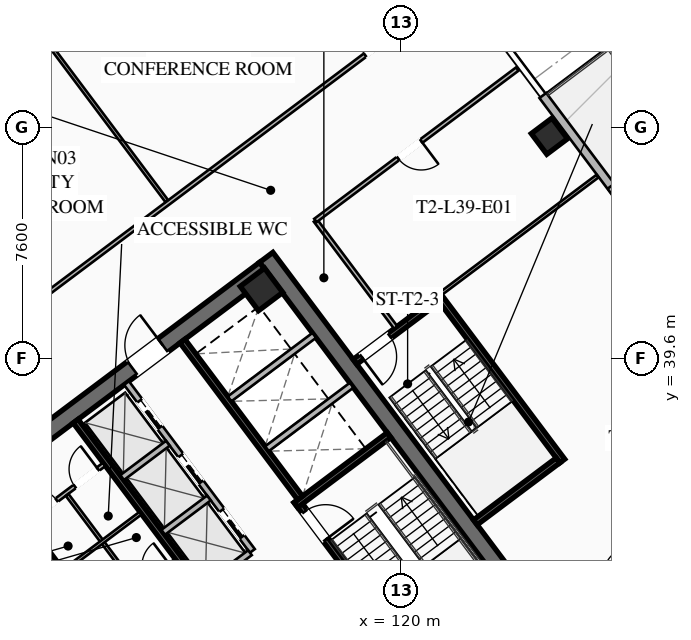
"""IFC4 building model, lengths in metres.
Left out: names, types, materials, properties, quantities, classifications, styles, units other than length and angle.
Written with IfcOpenShell. Run it as: python <this file> out.ifc"""

import sys

from ifc_helpers import new_model, si_unit, direction, frame, frame_2d, origin, origin_2d, place, context, subcontext, project, spatial, rectangle, hollow_rectangle, extrude, element, fill, save


model = new_model("IFC4")
c1 = context("Model", 3, precision=1e-05, world=origin(), true_north=direction((0.0, 1.0)))
c2 = subcontext(c1, "Body", "Model", "MODEL_VIEW")
j1 = project(units=[si_unit("LENGTHUNIT", "METRE"), si_unit("PLANEANGLEUNIT", "RADIAN")], contexts=[c1])
p1 = place(None, origin())
s1 = spatial("IfcSite", under=j1, at=p1, CompositionType="ELEMENT")
p2 = place(p1, origin())
s2 = spatial("IfcBuilding", under=s1, at=p2, CompositionType="ELEMENT")
p3 = place(p2, frame((0.0, 0.0, 146.35)))
s3 = spatial("IfcBuildingStorey", under=s2, at=p3, CompositionType="ELEMENT", Elevation=146.35)
for number, where, z_axis, x_axis in (
    (1, (112.436, 21.077, 0.0), (0.0, 0.0, 1.0), (-0.6, 0.8, 0.0)),
    (2, (115.564, 42.923, 0.0), (0.0, 0.0, 1.0), (0.6, -0.8, 0.0)),
):
    element("IfcWall", number, at=place(p3, frame(where, z_axis=z_axis, x_axis=x_axis)), inside=s3, PredefinedType="SHEAR", context=c2, shape_type="SweptSolid", body=[
        extrude(rectangle(XDim=15.6, YDim=0.55, at=frame_2d((7.8, 0.0))), origin(), (0.0, 0.0, 1.0), 3.55),
    ])
p4 = place(p3, frame((103.461, 33.502, 0.0), z_axis=(0.0, 0.0, 1.0), x_axis=(0.799998054672, 0.600002593761, 0.0)))
e3 = element("IfcWall", 3, at=p4, inside=s3, PredefinedType="SHEAR", context=c2, shape_type="SweptSolid", body=[
    extrude(rectangle(XDim=15.06, YDim=0.55, at=frame_2d((7.53, 0.0))), origin(), (0.0, 0.0, 1.0), 3.55),
])
p5 = place(p4, frame((4.58, 0.0, 0.0)))
e4 = element("IfcOpeningElement", 4, at=p5, cuts=e3, PredefinedType="OPENING", context=c2, shape_type="SweptSolid", body=[
    extrude(rectangle(XDim=1.25, YDim=2.25, at=frame_2d((0.625, 1.125))), frame((0.0, 0.285, 0.0), z_axis=(0.0, -1.0, 0.0), x_axis=(1.0, 0.0, 0.0)), (0.0, 0.0, 1.0), 0.57),
])
p6 = place(p4, frame((9.63, 0.0, 0.0)))
e5 = element("IfcOpeningElement", 5, at=p6, cuts=e3, PredefinedType="OPENING", context=c2, shape_type="SweptSolid", body=[
    extrude(rectangle(XDim=1.25, YDim=2.25, at=frame_2d((0.625, 1.125))), frame((0.0, 0.285, 0.0), z_axis=(0.0, -1.0, 0.0), x_axis=(1.0, 0.0, 0.0)), (0.0, 0.0, 1.0), 0.57),
])
p7 = place(p3, frame((115.41, 41.87, 0.0), z_axis=(0.0, 0.0, 1.0), x_axis=(0.799999996291, 0.600000004945, 0.0)))
e6 = element("IfcColumn", 6, at=p7, inside=s3, PredefinedType="COLUMN", context=c2, shape_type="SweptSolid", body=[
    extrude(hollow_rectangle(XDim=1.0, YDim=1.0, WallThickness=0.04, at=origin_2d()), origin(), (0.0, 0.0, 1.0), 3.37),
])
p8 = place(p3, frame((124.88, 46.91, 0.0), z_axis=(0.0, 0.0, 1.0), x_axis=(0.799999996291, 0.600000004945, 0.0)))
e7 = element("IfcColumn", 7, at=p8, inside=s3, PredefinedType="COLUMN", context=c2, shape_type="SweptSolid", body=[
    extrude(hollow_rectangle(XDim=0.85, YDim=0.85, WallThickness=0.035, at=origin_2d()), origin(), (0.0, 0.0, 1.0), 3.37),
])
p9 = place(p3, frame((124.664, 48.248, 0.0), z_axis=(0.0, 0.0, 1.0), x_axis=(0.599994081423, -0.800004438899, 0.0)))
e8 = element("IfcWall", 8, at=p9, inside=s3, PredefinedType="SOLIDWALL", context=c2, shape_type="SweptSolid", body=[
    extrude(rectangle(XDim=13.2, YDim=0.28, at=frame_2d((6.6, 0.0))), origin(), (0.0, 0.0, 1.0), 3.37),
])
p10 = place(p9, frame((5.95, 0.0, 0.0)))
e9 = element("IfcOpeningElement", 9, at=p10, cuts=e8, PredefinedType="OPENING", context=c2, shape_type="SweptSolid", body=[
    extrude(rectangle(XDim=1.3, YDim=2.15, at=frame_2d((0.65, 1.075))), frame((0.0, 0.15, 0.0), z_axis=(0.0, -1.0, 0.0), x_axis=(1.0, 0.0, 0.0)), (0.0, 0.0, 1.0), 0.3),
])
p11 = place(p9, frame((3.732, 0.0, 0.85)))
e10 = element("IfcOpeningElement", 10, at=p11, cuts=e8, PredefinedType="OPENING", context=c2, shape_type="SweptSolid", body=[
    extrude(rectangle(XDim=1.8, YDim=1.92, at=frame_2d((0.9, 0.96))), frame((0.0, 0.15, 0.0), z_axis=(0.0, -1.0, 0.0), x_axis=(1.0, 0.0, 0.0)), (0.0, 0.0, 1.0), 0.3),
])
p12 = place(p9, frame((7.668, 0.0, 0.85)))
e11 = element("IfcOpeningElement", 11, at=p12, cuts=e8, PredefinedType="OPENING", context=c2, shape_type="SweptSolid", body=[
    extrude(rectangle(XDim=1.8, YDim=1.92, at=frame_2d((0.9, 0.96))), frame((0.0, 0.15, 0.0), z_axis=(0.0, -1.0, 0.0), x_axis=(1.0, 0.0, 0.0)), (0.0, 0.0, 1.0), 0.3),
])
p13 = place(p3, frame((111.44, 29.08, 0.0), z_axis=(0.0, 0.0, 1.0), x_axis=(-0.59999029481, 0.8000072788, 0.0)))
e12 = element("IfcWall", 12, at=p13, inside=s3, PredefinedType="SHEAR", context=c2, shape_type="SweptSolid", body=[
    extrude(rectangle(XDim=8.05, YDim=0.2, at=frame_2d((4.025, 0.0))), origin(), (0.0, 0.0, 1.0), 3.37),
])
p14 = place(p13, frame((0.45, 0.0, 0.0)))
e13 = element("IfcOpeningElement", 13, at=p14, cuts=e12, PredefinedType="OPENING", context=c2, shape_type="SweptSolid", body=[
    extrude(rectangle(XDim=1.15, YDim=2.2, at=frame_2d((0.575, 1.1))), frame((0.0, 0.11, 0.0), z_axis=(0.0, -1.0, 0.0), x_axis=(1.0, 0.0, 0.0)), (0.0, 0.0, 1.0), 0.22),
])
p15 = place(p3, frame((116.56, 34.92, 0.0), z_axis=(0.0, 0.0, 1.0), x_axis=(0.59999029481, -0.8000072788, 0.0)))
e14 = element("IfcWall", 14, at=p15, inside=s3, PredefinedType="SHEAR", context=c2, shape_type="SweptSolid", body=[
    extrude(rectangle(XDim=8.05, YDim=0.2, at=frame_2d((4.025, 0.0))), origin(), (0.0, 0.0, 1.0), 3.37),
])
p16 = place(p15, frame((0.45, 0.0, 0.0)))
e15 = element("IfcOpeningElement", 15, at=p16, cuts=e14, PredefinedType="OPENING", context=c2, shape_type="SweptSolid", body=[
    extrude(rectangle(XDim=1.15, YDim=2.2, at=frame_2d((0.575, 1.1))), frame((0.0, 0.11, 0.0), z_axis=(0.0, -1.0, 0.0), x_axis=(1.0, 0.0, 0.0)), (0.0, 0.0, 1.0), 0.22),
])
p17 = place(p3, frame((116.54, 34.78, 0.0), z_axis=(0.0, 0.0, 1.0), x_axis=(0.800015298837, 0.599979601008, 0.0)))
e16 = element("IfcWall", 16, at=p17, inside=s3, PredefinedType="SHEAR", context=c2, shape_type="SweptSolid", body=[
    extrude(rectangle(XDim=3.83, YDim=0.2, at=frame_2d((1.915, 0.0))), origin(), (0.0, 0.0, 1.0), 3.37),
])
p18 = place(p3, frame((117.998, 25.936, 0.0), z_axis=(0.0, 0.0, 1.0), x_axis=(-0.600002693989, 0.799997979501, 0.0)))
e17 = element("IfcWall", 17, at=p18, inside=s3, PredefinedType="SHEAR", context=c2, shape_type="SweptSolid", body=[
    extrude(rectangle(XDim=14.5, YDim=0.2, at=frame_2d((7.25, 0.0))), origin(), (0.0, 0.0, 1.0), 3.37),
])
p19 = place(p3, frame((110.104, 31.028, 0.0), z_axis=(0.0, 0.0, 1.0), x_axis=(0.800018601094, 0.59997519774, 0.0)))
e18 = element("IfcWall", 18, at=p19, inside=s3, PredefinedType="SOLIDWALL", context=c2, shape_type="SweptSolid", body=[
    extrude(rectangle(XDim=3.15, YDim=0.22, at=frame_2d((1.575, 0.0))), origin(), (0.0, 0.0, 1.0), 2.723),
])
p20 = place(p19, frame((0.25, 0.0, 0.0)))
e19 = element("IfcOpeningElement", 19, at=p20, cuts=e18, PredefinedType="OPENING", context=c2, shape_type="SweptSolid", body=[
    extrude(rectangle(XDim=0.95, YDim=2.05, at=frame_2d((0.475, 1.025))), frame((0.0, 0.12, 0.0), z_axis=(0.0, -1.0, 0.0), x_axis=(1.0, 0.0, 0.0)), (0.0, 0.0, 1.0), 0.24),
])
p21 = place(p19, frame((1.95, 0.0, 0.0)))
e20 = element("IfcOpeningElement", 20, at=p21, cuts=e18, PredefinedType="OPENING", context=c2, shape_type="SweptSolid", body=[
    extrude(rectangle(XDim=0.95, YDim=2.05, at=frame_2d((0.475, 1.025))), frame((0.0, 0.12, 0.0), z_axis=(0.0, -1.0, 0.0), x_axis=(1.0, 0.0, 0.0)), (0.0, 0.0, 1.0), 0.24),
])
p22 = place(p3, frame((112.81, 40.17, 0.0), z_axis=(0.0, 0.0, 1.0), x_axis=(0.599993943644, -0.800004542231, 0.0)))
e21 = element("IfcWall", 21, at=p22, inside=s3, PredefinedType="SHEAR", context=c2, shape_type="SweptSolid", body=[
    extrude(rectangle(XDim=6.45, YDim=0.2, at=frame_2d((3.225, 0.0))), origin(), (0.0, 0.0, 1.0), 3.37),
])
for number, where, z_axis, x_axis in (
    (22, (115.59, 36.63, 0.0), (0.0, 0.0, 1.0), (0.8, 0.6, 0.0)),
    (23, (114.36, 38.27, 0.0), (0.0, 0.0, 1.0), (0.8, 0.6, 0.0)),
):
    element("IfcWall", number, at=place(p3, frame(where, z_axis=z_axis, x_axis=x_axis)), inside=s3, PredefinedType="SOLIDWALL", context=c2, shape_type="SweptSolid", body=[
        extrude(rectangle(XDim=3.48, YDim=0.2, at=frame_2d((1.74, 0.0))), origin(), (0.0, 0.0, 1.0), 3.37),
    ])
p23 = place(p3, frame((107.71, 34.22, 0.0), z_axis=(0.0, 0.0, 1.0), x_axis=(0.799981399002, 0.60002480053, 0.0)))
e24 = element("IfcWall", 24, at=p23, inside=s3, PredefinedType="PARTITIONING", context=c2, shape_type="SweptSolid", body=[
    extrude(rectangle(XDim=3.15, YDim=0.135, at=frame_2d((1.575, 0.0))), origin(), (0.0, 0.0, 1.0), 2.723),
])
p24 = place(p23, frame((0.25, 0.0, 0.0)))
e25 = element("IfcOpeningElement", 25, at=p24, cuts=e24, PredefinedType="OPENING", context=c2, shape_type="SweptSolid", body=[
    extrude(rectangle(XDim=0.95, YDim=2.05, at=frame_2d((0.475, 1.025))), frame((0.0, 0.077, 0.0), z_axis=(0.0, -1.0, 0.0), x_axis=(1.0, 0.0, 0.0)), (0.0, 0.0, 1.0), 0.155),
])
p25 = place(p23, frame((1.95, 0.0, 0.0)))
e26 = element("IfcOpeningElement", 26, at=p25, cuts=e24, PredefinedType="OPENING", context=c2, shape_type="SweptSolid", body=[
    extrude(rectangle(XDim=0.95, YDim=2.05, at=frame_2d((0.475, 1.025))), frame((0.0, 0.077, 0.0), z_axis=(0.0, -1.0, 0.0), x_axis=(1.0, 0.0, 0.0)), (0.0, 0.0, 1.0), 0.155),
])
p26 = place(p3, frame((111.296, 32.072, 0.0), z_axis=(0.0, 0.0, 1.0), x_axis=(-0.59995887973, 0.800030838552, 0.0)))
e27 = element("IfcWall", 27, at=p26, inside=s3, PredefinedType="PARTITIONING", context=c2, shape_type="SweptSolid", body=[
    extrude(rectangle(XDim=3.8, YDim=0.11, at=frame_2d((1.9, 0.0))), origin(), (0.0, 0.0, 1.0), 2.723),
])
p27 = place(p3, frame((108.91, 32.62, 0.0), z_axis=(0.0, 0.0, 1.0), x_axis=(0.800018601094, 0.59997519774, 0.0)))
e28 = element("IfcWall", 28, at=p27, inside=s3, PredefinedType="PARTITIONING", context=c2, shape_type="SweptSolid", body=[
    extrude(rectangle(XDim=3.15, YDim=0.11, at=frame_2d((1.575, 0.0))), origin(), (0.0, 0.0, 1.0), 2.723),
])
p28 = place(p3, frame((115.11, 33.27, 0.0), z_axis=(0.0, 0.0, 1.0), x_axis=(-0.600011322243, 0.799991508192, 0.0)))
e29 = element("IfcWall", 29, at=p28, inside=s3, PredefinedType="SOLIDWALL", context=c2, shape_type="SweptSolid", body=[
    extrude(rectangle(XDim=6.9, YDim=0.2, at=frame_2d((3.45, 0.0))), origin(), (0.0, 0.0, 1.0), 3.37),
])
p29 = place(p28, frame((0.575, 0.0, 0.0)))
e30 = element("IfcOpeningElement", 30, at=p29, cuts=e29, PredefinedType="OPENING", context=c2, shape_type="SweptSolid", body=[
    extrude(rectangle(XDim=1.1, YDim=2.2, at=frame_2d((0.55, 1.1))), frame((0.0, 0.11, 0.0), z_axis=(0.0, -1.0, 0.0), x_axis=(1.0, 0.0, 0.0)), (0.0, 0.0, 1.0), 0.22),
])
p30 = place(p28, frame((2.825, 0.0, 0.0)))
e31 = element("IfcOpeningElement", 31, at=p30, cuts=e29, PredefinedType="OPENING", context=c2, shape_type="SweptSolid", body=[
    extrude(rectangle(XDim=1.1, YDim=2.2, at=frame_2d((0.55, 1.1))), frame((0.0, 0.11, 0.0), z_axis=(0.0, -1.0, 0.0), x_axis=(1.0, 0.0, 0.0)), (0.0, 0.0, 1.0), 0.22),
])
p31 = place(p28, frame((5.075, 0.0, 0.0)))
e32 = element("IfcOpeningElement", 32, at=p31, cuts=e29, PredefinedType="OPENING", context=c2, shape_type="SweptSolid", body=[
    extrude(rectangle(XDim=1.1, YDim=2.2, at=frame_2d((0.55, 1.1))), frame((0.0, 0.11, 0.0), z_axis=(0.0, -1.0, 0.0), x_axis=(1.0, 0.0, 0.0)), (0.0, 0.0, 1.0), 0.22),
])
p32 = place(p3, frame((113.526, 32.082, 0.0), z_axis=(0.0, 0.0, 1.0), x_axis=(0.800046745961, 0.599937666993, 0.0)))
e33 = element("IfcWall", 33, at=p32, inside=s3, PredefinedType="SOLIDWALL", context=c2, shape_type="SweptSolid", body=[
    extrude(rectangle(XDim=1.88, YDim=0.2, at=frame_2d((0.94, 0.0))), origin(), (0.0, 0.0, 1.0), 3.37),
])
p33 = place(p3, frame((112.176, 33.882, 0.0), z_axis=(0.0, 0.0, 1.0), x_axis=(0.8, 0.6, 0.0)))
e34 = element("IfcWall", 34, at=p33, inside=s3, PredefinedType="SOLIDWALL", context=c2, shape_type="SweptSolid", body=[
    extrude(rectangle(XDim=1.88, YDim=0.2, at=frame_2d((0.94, 0.0))), origin(), (0.0, 0.0, 1.0), 3.37),
])
p34 = place(p3, frame((110.826, 35.682, 0.0), z_axis=(0.0, 0.0, 1.0), x_axis=(0.799984418148, 0.600020775241, 0.0)))
e35 = element("IfcWall", 35, at=p34, inside=s3, PredefinedType="SOLIDWALL", context=c2, shape_type="SweptSolid", body=[
    extrude(rectangle(XDim=1.88, YDim=0.2, at=frame_2d((0.94, 0.0))), origin(), (0.0, 0.0, 1.0), 3.37),
])
p35 = place(p3, frame((125.304, 36.228, 0.0), z_axis=(0.0, 0.0, 1.0), x_axis=(-0.59998851072, 0.800008616831, 0.0)))
e36 = element("IfcWall", 36, at=p35, inside=s3, PredefinedType="SHEAR", context=c2, shape_type="SweptSolid", body=[
    extrude(rectangle(XDim=6.8, YDim=0.2, at=frame_2d((3.4, 0.0))), origin(), (0.0, 0.0, 1.0), 3.37),
])
p36 = place(p3, frame((121.204, 41.528, 0.0), z_axis=(0.0, 0.0, 1.0), x_axis=(-0.800017232136, -0.599977023131, 0.0)))
e37 = element("IfcWall", 37, at=p36, inside=s3, PredefinedType="SHEAR", context=c2, shape_type="SweptSolid", body=[
    extrude(rectangle(XDim=3.4, YDim=0.2, at=frame_2d((1.7, 0.0))), origin(), (0.0, 0.0, 1.0), 3.37),
])
p37 = place(p36, frame((1.975, 0.0, 0.0)))
e38 = element("IfcOpeningElement", 38, at=p37, cuts=e37, PredefinedType="OPENING", context=c2, shape_type="SweptSolid", body=[
    extrude(rectangle(XDim=1.15, YDim=2.2, at=frame_2d((0.575, 1.1))), frame((0.0, 0.11, 0.0), z_axis=(0.0, -1.0, 0.0), x_axis=(1.0, 0.0, 0.0)), (0.0, 0.0, 1.0), 0.22),
])
p38 = place(p3, frame((122.444, 34.208, 0.0), z_axis=(0.0, 0.0, 1.0), x_axis=(0.79999138319, 0.600011488909, 0.0)))
e39 = element("IfcWall", 39, at=p38, inside=s3, PredefinedType="SHEAR", context=c2, shape_type="SweptSolid", body=[
    extrude(rectangle(XDim=3.4, YDim=0.2, at=frame_2d((1.7, 0.0))), origin(), (0.0, 0.0, 1.0), 3.37),
])
p39 = place(p3, frame((119.824, 40.618, 0.0), z_axis=(0.0, 0.0, 1.0), x_axis=(-0.599982243973, 0.800013316712, 0.0)))
e40 = element("IfcWall", 40, at=p39, inside=s3, PredefinedType="PARTITIONING", context=c2, shape_type="SweptSolid", body=[
    extrude(rectangle(XDim=4.4, YDim=0.135, at=frame_2d((2.2, 0.0))), origin(), (0.0, 0.0, 1.0), 2.723),
])
p40 = place(p3, frame((94.778, 31.546, 0.0), z_axis=(0.0, 0.0, 1.0), x_axis=(0.8, 0.6, 0.0)))
e41 = element("IfcWall", 41, at=p40, inside=s3, PredefinedType="PARTITIONING", context=c2, shape_type="SweptSolid", body=[
    extrude(rectangle(XDim=31.3, YDim=0.135, at=frame_2d((15.65, 0.0))), origin(), (0.0, 0.0, 1.0), 2.723),
])
p41 = place(p40, frame((0.3, 0.0, 0.0)))
e42 = element("IfcOpeningElement", 42, at=p41, cuts=e41, PredefinedType="OPENING", context=c2, shape_type="SweptSolid", body=[
    extrude(rectangle(XDim=0.95, YDim=2.05, at=frame_2d((0.475, 1.025))), frame((0.0, 0.077, 0.0), z_axis=(0.0, -1.0, 0.0), x_axis=(1.0, 0.0, 0.0)), (0.0, 0.0, 1.0), 0.155),
])
p42 = place(p40, frame((11.21, 0.0, 0.0)))
e43 = element("IfcOpeningElement", 43, at=p42, cuts=e41, PredefinedType="OPENING", context=c2, shape_type="SweptSolid", body=[
    extrude(rectangle(XDim=0.95, YDim=2.05, at=frame_2d((0.475, 1.025))), frame((0.0, 0.077, 0.0), z_axis=(0.0, -1.0, 0.0), x_axis=(1.0, 0.0, 0.0)), (0.0, 0.0, 1.0), 0.155),
])
p43 = place(p40, frame((15.487, 0.0, 0.0)))
e44 = element("IfcOpeningElement", 44, at=p43, cuts=e41, PredefinedType="OPENING", context=c2, shape_type="SweptSolid", body=[
    extrude(rectangle(XDim=0.95, YDim=2.05, at=frame_2d((0.475, 1.025))), frame((0.0, 0.077, 0.0), z_axis=(0.0, -1.0, 0.0), x_axis=(1.0, 0.0, 0.0)), (0.0, 0.0, 1.0), 0.155),
])
p44 = place(p40, frame((30.05, 0.0, 0.0)))
e45 = element("IfcOpeningElement", 45, at=p44, cuts=e41, PredefinedType="OPENING", context=c2, shape_type="SweptSolid", body=[
    extrude(rectangle(XDim=0.95, YDim=2.05, at=frame_2d((0.475, 1.025))), frame((0.0, 0.077, 0.0), z_axis=(0.0, -1.0, 0.0), x_axis=(1.0, 0.0, 0.0)), (0.0, 0.0, 1.0), 0.155),
])
p45 = place(p3, frame((112.29, 44.78, 0.0), z_axis=(0.0, 0.0, 1.0), x_axis=(-0.6, 0.8, 0.0)))
e46 = element("IfcWall", 46, at=p45, inside=s3, PredefinedType="PARTITIONING", context=c2, shape_type="SweptSolid", body=[
    extrude(rectangle(XDim=7.03, YDim=0.11, at=frame_2d((3.515, 0.0))), origin(), (0.0, 0.0, 1.0), 2.723),
])
p46 = place(p3, frame((132.13, 33.91, 0.0), z_axis=(0.0, 0.0, 1.0), x_axis=(-0.799997191971, -0.600003744021, 0.0)))
e47 = element("IfcWall", 47, at=p46, inside=s3, PredefinedType="PARTITIONING", context=c2, shape_type="SweptSolid", body=[
    extrude(rectangle(XDim=31.3, YDim=0.135, at=frame_2d((15.65, 0.0))), origin(), (0.0, 0.0, 1.0), 2.723),
])
p47 = place(p46, frame((29.97, 0.0, 0.0)))
e48 = element("IfcOpeningElement", 48, at=p47, cuts=e47, PredefinedType="OPENING", context=c2, shape_type="SweptSolid", body=[
    extrude(rectangle(XDim=0.95, YDim=2.05, at=frame_2d((0.475, 1.025))), frame((0.0, 0.077, 0.0), z_axis=(0.0, -1.0, 0.0), x_axis=(1.0, 0.0, 0.0)), (0.0, 0.0, 1.0), 0.155),
])
p48 = place(p46, frame((0.38, 0.0, 0.0)))
e49 = element("IfcOpeningElement", 49, at=p48, cuts=e47, PredefinedType="OPENING", context=c2, shape_type="SweptSolid", body=[
    extrude(rectangle(XDim=0.95, YDim=2.05, at=frame_2d((0.475, 1.025))), frame((0.0, 0.077, 0.0), z_axis=(0.0, -1.0, 0.0), x_axis=(1.0, 0.0, 0.0)), (0.0, 0.0, 1.0), 0.155),
])
p49 = place(p3, frame((123.824, 49.118, 0.0), z_axis=(0.0, 0.0, 1.0), x_axis=(-0.799996470201, -0.60000470637, 0.0)))
e50 = element("IfcWall", 50, at=p49, inside=s3, PredefinedType="PARTITIONING", context=c2, shape_type="SweptSolid", body=[
    extrude(rectangle(XDim=8.3, YDim=0.135, at=frame_2d((4.15, 0.0))), origin(), (0.0, 0.0, 1.0), 2.723),
])
p50 = place(p49, frame((3.95, 0.0, 0.0)))
e51 = element("IfcOpeningElement", 51, at=p50, cuts=e50, PredefinedType="OPENING", context=c2, shape_type="SweptSolid", body=[
    extrude(rectangle(XDim=0.95, YDim=2.05, at=frame_2d((0.475, 1.025))), frame((0.0, 0.077, 0.0), z_axis=(0.0, -1.0, 0.0), x_axis=(1.0, 0.0, 0.0)), (0.0, 0.0, 1.0), 0.155),
])
p51 = place(p3, frame((125.208, 30.656, 0.0), z_axis=(0.0, 0.0, 1.0), x_axis=(0.800005876956, 0.599992163979, 0.0)))
e52 = element("IfcWall", 52, at=p51, inside=s3, PredefinedType="PARTITIONING", context=c2, shape_type="SweptSolid", body=[
    extrude(rectangle(XDim=9.97, YDim=0.135, at=frame_2d((4.985, 0.0))), origin(), (0.0, 0.0, 1.0), 2.723),
])
p52 = place(p51, frame((2.045, 0.0, 0.0)))
e53 = element("IfcOpeningElement", 53, at=p52, cuts=e52, PredefinedType="OPENING", context=c2, shape_type="SweptSolid", body=[
    extrude(rectangle(XDim=0.95, YDim=2.05, at=frame_2d((0.475, 1.025))), frame((0.0, 0.077, 0.0), z_axis=(0.0, -1.0, 0.0), x_axis=(1.0, 0.0, 0.0)), (0.0, 0.0, 1.0), 0.155),
])
p53 = place(p3, frame((126.464, 45.598, 0.0), z_axis=(0.0, 0.0, 1.0), x_axis=(-0.8000181681, -0.599975775102, 0.0)))
e54 = element("IfcWall", 54, at=p53, inside=s3, PredefinedType="PARTITIONING", context=c2, shape_type="SweptSolid", body=[
    extrude(rectangle(XDim=6.45, YDim=0.11, at=frame_2d((3.225, 0.0))), origin(), (0.0, 0.0, 1.0), 2.723),
])
p54 = place(p3, frame((112.104, 20.928, 0.0), z_axis=(0.0, 0.0, 1.0), x_axis=(-0.599994940075, 0.800003794918, 0.0)))
e55 = element("IfcWall", 55, at=p54, inside=s3, PredefinedType="PARTITIONING", context=c2, shape_type="SweptSolid", body=[
    extrude(rectangle(XDim=15.44, YDim=0.135, at=frame_2d((7.72, 0.0))), origin(), (0.0, 0.0, 1.0), 2.723),
])
p55 = place(p11, origin())
e56 = element("IfcWindow", 56, at=p55, inside=s3, PartitioningType="SINGLE_PANEL", PredefinedType="WINDOW", context=c2, shape_type="SweptSolid", body=[
    extrude(rectangle(XDim=1.8, YDim=1.92, at=frame_2d((0.9, 0.96))), frame((0.0, 0.03, 0.0), z_axis=(0.0, -1.0, 0.0), x_axis=(1.0, 0.0, 0.0)), (0.0, 0.0, 1.0), 0.06),
])
fill(e10, e56)
p56 = place(p6, origin())
e57 = element("IfcDoor", 57, at=p56, inside=s3, OperationType="SINGLE_SWING_RIGHT", PredefinedType="DOOR", context=c2, shape_type="SweptSolid", body=[
    extrude(rectangle(XDim=1.25, YDim=2.25, at=frame_2d((0.625, 1.125))), frame((0.0, 0.025, 0.0), z_axis=(0.0, -1.0, 0.0), x_axis=(1.0, 0.0, 0.0)), (0.0, 0.0, 1.0), 0.05),
])
fill(e5, e57)
p57 = place(p16, origin())
e58 = element("IfcDoor", 58, at=p57, inside=s3, OperationType="SINGLE_SWING_RIGHT", PredefinedType="DOOR", context=c2, shape_type="SweptSolid", body=[
    extrude(rectangle(XDim=1.15, YDim=2.2, at=frame_2d((0.575, 1.1))), frame((0.0, 0.025, 0.0), z_axis=(0.0, -1.0, 0.0), x_axis=(1.0, 0.0, 0.0)), (0.0, 0.0, 1.0), 0.05),
])
fill(e15, e58)
p58 = place(p24, origin())
e59 = element("IfcDoor", 59, at=p58, inside=s3, OperationType="SINGLE_SWING_LEFT", PredefinedType="DOOR", context=c2, shape_type="SweptSolid", body=[
    extrude(rectangle(XDim=0.95, YDim=2.05, at=frame_2d((0.475, 1.025))), frame((0.0, 0.025, 0.0), z_axis=(0.0, -1.0, 0.0), x_axis=(1.0, 0.0, 0.0)), (0.0, 0.0, 1.0), 0.05),
])
fill(e25, e59)
p59 = place(p25, origin())
e60 = element("IfcDoor", 60, at=p59, inside=s3, OperationType="SINGLE_SWING_RIGHT", PredefinedType="DOOR", context=c2, shape_type="SweptSolid", body=[
    extrude(rectangle(XDim=0.95, YDim=2.05, at=frame_2d((0.475, 1.025))), frame((0.0, 0.025, 0.0), z_axis=(0.0, -1.0, 0.0), x_axis=(1.0, 0.0, 0.0)), (0.0, 0.0, 1.0), 0.05),
])
fill(e26, e60)
p60 = place(p37, origin())
e61 = element("IfcDoor", 61, at=p60, inside=s3, OperationType="SINGLE_SWING_RIGHT", PredefinedType="DOOR", context=c2, shape_type="SweptSolid", body=[
    extrude(rectangle(XDim=1.15, YDim=2.2, at=frame_2d((0.575, 1.1))), frame((0.0, 0.025, 0.0), z_axis=(0.0, -1.0, 0.0), x_axis=(1.0, 0.0, 0.0)), (0.0, 0.0, 1.0), 0.05),
])
fill(e38, e61)
p61 = place(p44, origin())
e62 = element("IfcDoor", 62, at=p61, inside=s3, OperationType="SINGLE_SWING_RIGHT", PredefinedType="DOOR", context=c2, shape_type="SweptSolid", body=[
    extrude(rectangle(XDim=0.95, YDim=2.05, at=frame_2d((0.475, 1.025))), frame((0.0, 0.025, 0.0), z_axis=(0.0, -1.0, 0.0), x_axis=(1.0, 0.0, 0.0)), (0.0, 0.0, 1.0), 0.05),
])
fill(e45, e62)
p62 = place(p50, origin())
e63 = element("IfcDoor", 63, at=p62, inside=s3, OperationType="SINGLE_SWING_LEFT", PredefinedType="DOOR", context=c2, shape_type="SweptSolid", body=[
    extrude(rectangle(XDim=0.95, YDim=2.05, at=frame_2d((0.475, 1.025))), frame((0.0, 0.025, 0.0), z_axis=(0.0, -1.0, 0.0), x_axis=(1.0, 0.0, 0.0)), (0.0, 0.0, 1.0), 0.05),
])
fill(e51, e63)
p63 = place(p29, origin())
e64 = element("IfcDoor", 64, at=p63, inside=s3, OperationType="SLIDING_TO_LEFT", PredefinedType="DOOR", context=c2, shape_type="SweptSolid", body=[
    extrude(rectangle(XDim=1.1, YDim=2.2, at=frame_2d((0.55, 1.1))), frame((0.0, 0.025, 0.0), z_axis=(0.0, -1.0, 0.0), x_axis=(1.0, 0.0, 0.0)), (0.0, 0.0, 1.0), 0.05),
])
fill(e30, e64)
p64 = place(p30, origin())
e65 = element("IfcDoor", 65, at=p64, inside=s3, OperationType="SLIDING_TO_LEFT", PredefinedType="DOOR", context=c2, shape_type="SweptSolid", body=[
    extrude(rectangle(XDim=1.1, YDim=2.2, at=frame_2d((0.55, 1.1))), frame((0.0, 0.025, 0.0), z_axis=(0.0, -1.0, 0.0), x_axis=(1.0, 0.0, 0.0)), (0.0, 0.0, 1.0), 0.05),
])
fill(e31, e65)
p65 = place(p31, origin())
e66 = element("IfcDoor", 66, at=p65, inside=s3, OperationType="SLIDING_TO_LEFT", PredefinedType="DOOR", context=c2, shape_type="SweptSolid", body=[
    extrude(rectangle(XDim=1.1, YDim=2.2, at=frame_2d((0.55, 1.1))), frame((0.0, 0.025, 0.0), z_axis=(0.0, -1.0, 0.0), x_axis=(1.0, 0.0, 0.0)), (0.0, 0.0, 1.0), 0.05),
])
fill(e32, e66)
save(model, sys.argv[1])
